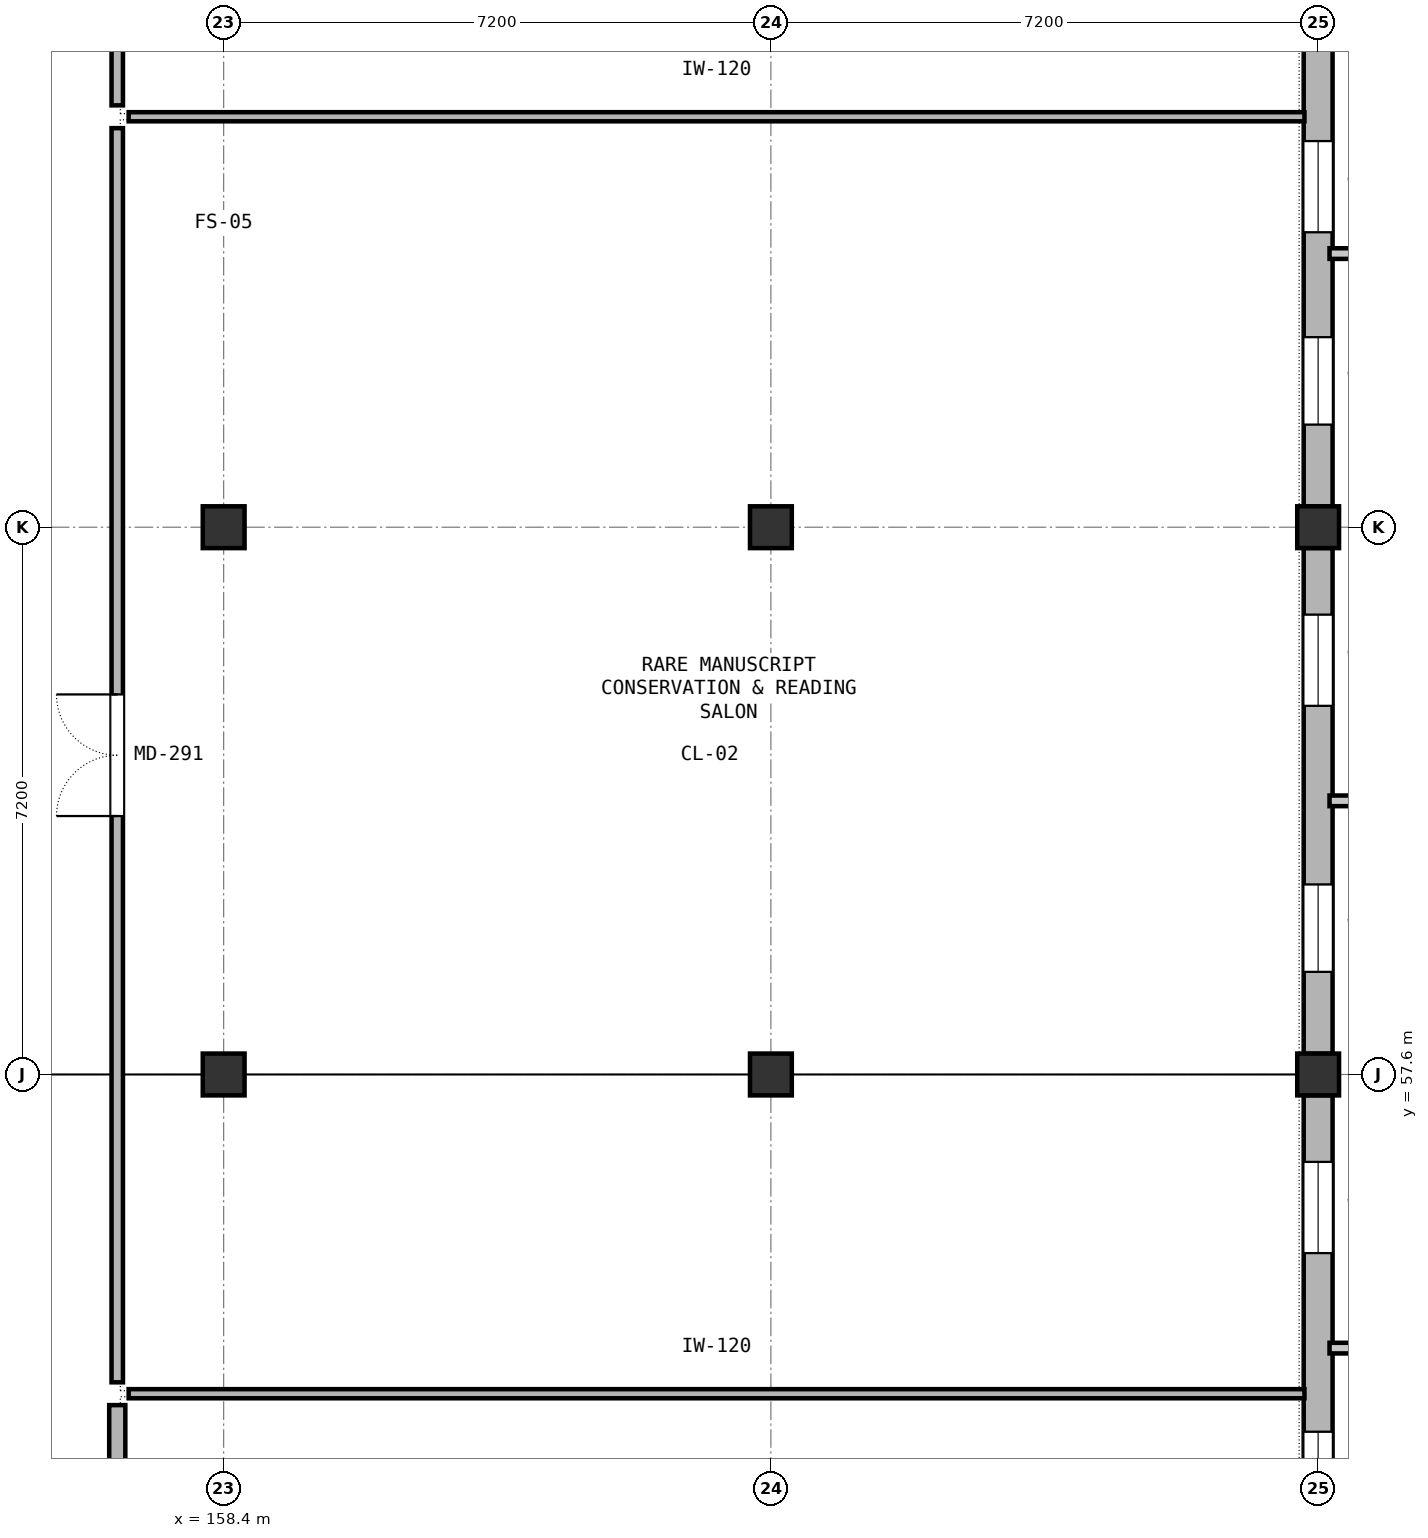
"""IFC4 building model, lengths in metres.
Left out: names, types, materials, properties, quantities, classifications, styles, units other than length and angle.
Written with IfcOpenShell. Run it as: python <this file> out.ifc"""

import sys

from ifc_helpers import new_model, si_unit, direction, frame, frame_2d, origin, origin_2d, place, context, subcontext, project, spatial, rectangle, extrude, element, fill, save


model = new_model("IFC4")
c1 = context("Model", 3, precision=1e-05, world=origin(), true_north=direction((0.0, 1.0)))
c2 = subcontext(c1, "Body", "Model", "MODEL_VIEW")
j1 = project(units=[si_unit("LENGTHUNIT", "METRE"), si_unit("PLANEANGLEUNIT", "RADIAN")], contexts=[c1])
p1 = place(None, origin())
s1 = spatial("IfcSite", under=j1, at=p1, CompositionType="ELEMENT")
p2 = place(p1, origin())
s2 = spatial("IfcBuilding", under=s1, at=p2, CompositionType="ELEMENT")
p3 = place(p2, frame((0.0, 0.0, 14.4)))
s3 = spatial("IfcBuildingStorey", under=s2, at=p3, CompositionType="ELEMENT", Elevation=14.4)
for number, where, z_axis, x_axis in (
    (1, (158.4, 57.6, 0.0), (0.0, 0.0, 1.0), (1.0, 0.0, 0.0)),
    (2, (158.4, 64.8, 0.0), (0.0, 0.0, 1.0), (1.0, 0.0, 0.0)),
    (3, (165.6, 57.6, 0.0), (0.0, 0.0, 1.0), (1.0, 0.0, 0.0)),
    (4, (165.6, 64.8, 0.0), (0.0, 0.0, 1.0), (1.0, 0.0, 0.0)),
    (5, (172.8, 57.6, 0.0), (0.0, 0.0, 1.0), (1.0, 0.0, 0.0)),
    (6, (172.8, 64.8, 0.0), (0.0, 0.0, 1.0), (1.0, 0.0, 0.0)),
):
    element("IfcColumn", number, at=place(p3, frame(where, z_axis=z_axis, x_axis=x_axis)), inside=s3, PredefinedType="COLUMN", context=c2, shape_type="SweptSolid", body=[
        extrude(rectangle(XDim=0.55, YDim=0.55, at=origin_2d()), origin(), (0.0, 0.0, 1.0), 4.2),
    ])
p4 = place(p3, frame((172.8, 57.327, 0.0), z_axis=(0.0, 0.0, 1.0), x_axis=(0.0, -1.0, 0.0)))
e7 = element("IfcWall", 7, at=p4, inside=s3, PredefinedType="SOLIDWALL", context=c2, shape_type="SweptSolid", body=[
    extrude(rectangle(XDim=6.654, YDim=0.38, at=frame_2d((3.327, 0.0))), origin(), (0.0, 0.0, 1.0), 3.04),
])
p5 = place(p4, frame((0.877, 0.0, 0.65)))
e8 = element("IfcOpeningElement", 8, at=p5, cuts=e7, PredefinedType="OPENING", context=c2, shape_type="SweptSolid", body=[
    extrude(rectangle(XDim=1.2, YDim=2.1, at=frame_2d((0.6, 1.05))), frame((0.0, 0.2, 0.0), z_axis=(0.0, -1.0, 0.0), x_axis=(1.0, 0.0, 0.0)), (0.0, 0.0, 1.0), 0.4),
])
p6 = place(p4, frame((4.427, 0.0, 0.65)))
e9 = element("IfcOpeningElement", 9, at=p6, cuts=e7, PredefinedType="OPENING", context=c2, shape_type="SweptSolid", body=[
    extrude(rectangle(XDim=1.15, YDim=2.24, at=frame_2d((0.575, 1.12))), frame((0.0, 0.2, 0.0), z_axis=(0.0, -1.0, 0.0), x_axis=(1.0, 0.0, 0.0)), (0.0, 0.0, 1.0), 0.4),
])
p7 = place(p3, frame((172.8, 64.527, 0.0), z_axis=(0.0, 0.0, 1.0), x_axis=(0.0, -1.0, 0.0)))
e10 = element("IfcWall", 10, at=p7, inside=s3, PredefinedType="SOLIDWALL", context=c2, shape_type="SweptSolid", body=[
    extrude(rectangle(XDim=6.654, YDim=0.38, at=frame_2d((3.327, 0.0))), origin(), (0.0, 0.0, 1.0), 3.04),
])
p8 = place(p7, frame((0.877, 0.0, 0.65)))
e11 = element("IfcOpeningElement", 11, at=p8, cuts=e10, PredefinedType="OPENING", context=c2, shape_type="SweptSolid", body=[
    extrude(rectangle(XDim=1.2, YDim=2.1, at=frame_2d((0.6, 1.05))), frame((0.0, 0.2, 0.0), z_axis=(0.0, -1.0, 0.0), x_axis=(1.0, 0.0, 0.0)), (0.0, 0.0, 1.0), 0.4),
])
p9 = place(p7, frame((4.427, 0.0, 0.65)))
e12 = element("IfcOpeningElement", 12, at=p9, cuts=e10, PredefinedType="OPENING", context=c2, shape_type="SweptSolid", body=[
    extrude(rectangle(XDim=1.15, YDim=2.24, at=frame_2d((0.575, 1.12))), frame((0.0, 0.2, 0.0), z_axis=(0.0, -1.0, 0.0), x_axis=(1.0, 0.0, 0.0)), (0.0, 0.0, 1.0), 0.4),
])
p10 = place(p3, frame((172.8, 71.727, 0.0), z_axis=(0.0, 0.0, 1.0), x_axis=(0.0, -1.0, 0.0)))
e13 = element("IfcWall", 13, at=p10, inside=s3, PredefinedType="SOLIDWALL", context=c2, shape_type="SweptSolid", body=[
    extrude(rectangle(XDim=6.654, YDim=0.38, at=frame_2d((3.327, 0.0))), origin(), (0.0, 0.0, 1.0), 3.04),
])
p11 = place(p10, frame((1.847, 0.0, 0.65)))
e14 = element("IfcOpeningElement", 14, at=p11, cuts=e13, PredefinedType="OPENING", context=c2, shape_type="SweptSolid", body=[
    extrude(rectangle(XDim=1.2, YDim=2.1, at=frame_2d((0.6, 1.05))), frame((0.0, 0.2, 0.0), z_axis=(0.0, -1.0, 0.0), x_axis=(1.0, 0.0, 0.0)), (0.0, 0.0, 1.0), 0.4),
])
p12 = place(p10, frame((4.427, 0.0, 0.65)))
e15 = element("IfcOpeningElement", 15, at=p12, cuts=e13, PredefinedType="OPENING", context=c2, shape_type="SweptSolid", body=[
    extrude(rectangle(XDim=1.15, YDim=2.24, at=frame_2d((0.575, 1.12))), frame((0.0, 0.2, 0.0), z_axis=(0.0, -1.0, 0.0), x_axis=(1.0, 0.0, 0.0)), (0.0, 0.0, 1.0), 0.4),
])
p13 = place(p3, frame((157.0, 36.95, 0.0), z_axis=(0.0, 0.0, 1.0), x_axis=(0.0, 1.0, 0.0)))
e16 = element("IfcWall", 16, at=p13, inside=s3, PredefinedType="PARTITIONING", context=c2, shape_type="SweptSolid", body=[
    extrude(rectangle(XDim=16.3, YDim=0.212, at=frame_2d((8.15, 0.0))), origin(), (0.0, 0.0, 1.0), 3.08),
])
p14 = place(p13, frame((7.65, 0.0, 0.0)))
e17 = element("IfcOpeningElement", 17, at=p14, cuts=e16, PredefinedType="OPENING", context=c2, shape_type="SweptSolid", body=[
    extrude(rectangle(XDim=1.0, YDim=2.2, at=frame_2d((0.5, 1.1))), frame((0.0, 0.116, 0.0), z_axis=(0.0, -1.0, 0.0), x_axis=(1.0, 0.0, 0.0)), (0.0, 0.0, 1.0), 0.232),
])
p15 = place(p3, frame((157.0, 53.55, 0.0), z_axis=(0.0, 0.0, 1.0), x_axis=(0.0, 1.0, 0.0)))
e18 = element("IfcWall", 18, at=p15, inside=s3, PredefinedType="PARTITIONING", context=c2, shape_type="SweptSolid", body=[
    extrude(rectangle(XDim=16.5, YDim=0.15, at=frame_2d((8.25, 0.0))), origin(), (0.0, 0.0, 1.0), 3.08),
])
p16 = place(p15, frame((7.45, 0.0, 0.0)))
e19 = element("IfcOpeningElement", 19, at=p16, cuts=e18, PredefinedType="OPENING", context=c2, shape_type="SweptSolid", body=[
    extrude(rectangle(XDim=1.6, YDim=2.2, at=frame_2d((0.8, 1.1))), frame((0.0, 0.085, 0.0), z_axis=(0.0, -1.0, 0.0), x_axis=(1.0, 0.0, 0.0)), (0.0, 0.0, 1.0), 0.17),
])
p17 = place(p3, frame((157.15, 53.4, 0.0), z_axis=(0.0, 0.0, 1.0), x_axis=(1.0, 0.0, 0.0)))
e20 = element("IfcWall", 20, at=p17, inside=s3, PredefinedType="PARTITIONING", context=c2, shape_type="SweptSolid", body=[
    extrude(rectangle(XDim=15.47, YDim=0.12, at=frame_2d((7.735, 0.0))), origin(), (0.0, 0.0, 1.0), 3.08),
])
p18 = place(p3, frame((157.0, 70.35, 0.0), z_axis=(0.0, 0.0, 1.0), x_axis=(0.0, 1.0, 0.0)))
e21 = element("IfcWall", 21, at=p18, inside=s3, PredefinedType="PARTITIONING", context=c2, shape_type="SweptSolid", body=[
    extrude(rectangle(XDim=8.1, YDim=0.15, at=frame_2d((4.05, 0.0))), origin(), (0.0, 0.0, 1.0), 3.08),
])
p19 = place(p18, frame((3.55, 0.0, 0.0)))
e22 = element("IfcOpeningElement", 22, at=p19, cuts=e21, PredefinedType="OPENING", context=c2, shape_type="SweptSolid", body=[
    extrude(rectangle(XDim=1.0, YDim=2.2, at=frame_2d((0.5, 1.1))), frame((0.0, 0.085, 0.0), z_axis=(0.0, -1.0, 0.0), x_axis=(1.0, 0.0, 0.0)), (0.0, 0.0, 1.0), 0.17),
])
p20 = place(p3, frame((157.15, 70.2, 0.0), z_axis=(0.0, 0.0, 1.0), x_axis=(1.0, 0.0, 0.0)))
e23 = element("IfcWall", 23, at=p20, inside=s3, PredefinedType="PARTITIONING", context=c2, shape_type="SweptSolid", body=[
    extrude(rectangle(XDim=15.47, YDim=0.12, at=frame_2d((7.735, 0.0))), origin(), (0.0, 0.0, 1.0), 3.08),
])
p21 = place(p5, origin())
e24 = element("IfcWindow", 24, at=p21, inside=s3, PartitioningType="DOUBLE_PANEL_VERTICAL", PredefinedType="WINDOW", context=c2, shape_type="SweptSolid", body=[
    extrude(rectangle(XDim=1.2, YDim=2.1, at=frame_2d((0.6, 1.05))), frame((0.0, 0.03, 0.0), z_axis=(0.0, -1.0, 0.0), x_axis=(1.0, 0.0, 0.0)), (0.0, 0.0, 1.0), 0.06),
])
fill(e8, e24)
p22 = place(p6, origin())
e25 = element("IfcWindow", 25, at=p22, inside=s3, PartitioningType="SINGLE_PANEL", PredefinedType="WINDOW", context=c2, shape_type="SweptSolid", body=[
    extrude(rectangle(XDim=1.15, YDim=2.24, at=frame_2d((0.575, 1.12))), frame((0.0, 0.03, 0.0), z_axis=(0.0, -1.0, 0.0), x_axis=(1.0, 0.0, 0.0)), (0.0, 0.0, 1.0), 0.06),
])
fill(e9, e25)
p23 = place(p8, origin())
e26 = element("IfcWindow", 26, at=p23, inside=s3, PartitioningType="DOUBLE_PANEL_VERTICAL", PredefinedType="WINDOW", context=c2, shape_type="SweptSolid", body=[
    extrude(rectangle(XDim=1.2, YDim=2.1, at=frame_2d((0.6, 1.05))), frame((0.0, 0.03, 0.0), z_axis=(0.0, -1.0, 0.0), x_axis=(1.0, 0.0, 0.0)), (0.0, 0.0, 1.0), 0.06),
])
fill(e11, e26)
p24 = place(p9, origin())
e27 = element("IfcWindow", 27, at=p24, inside=s3, PartitioningType="SINGLE_PANEL", PredefinedType="WINDOW", context=c2, shape_type="SweptSolid", body=[
    extrude(rectangle(XDim=1.15, YDim=2.24, at=frame_2d((0.575, 1.12))), frame((0.0, 0.03, 0.0), z_axis=(0.0, -1.0, 0.0), x_axis=(1.0, 0.0, 0.0)), (0.0, 0.0, 1.0), 0.06),
])
fill(e12, e27)
p25 = place(p11, origin())
e28 = element("IfcWindow", 28, at=p25, inside=s3, PartitioningType="DOUBLE_PANEL_VERTICAL", PredefinedType="WINDOW", context=c2, shape_type="SweptSolid", body=[
    extrude(rectangle(XDim=1.2, YDim=2.1, at=frame_2d((0.6, 1.05))), frame((0.0, 0.03, 0.0), z_axis=(0.0, -1.0, 0.0), x_axis=(1.0, 0.0, 0.0)), (0.0, 0.0, 1.0), 0.06),
])
fill(e14, e28)
p26 = place(p12, origin())
e29 = element("IfcWindow", 29, at=p26, inside=s3, PartitioningType="SINGLE_PANEL", PredefinedType="WINDOW", context=c2, shape_type="SweptSolid", body=[
    extrude(rectangle(XDim=1.15, YDim=2.24, at=frame_2d((0.575, 1.12))), frame((0.0, 0.03, 0.0), z_axis=(0.0, -1.0, 0.0), x_axis=(1.0, 0.0, 0.0)), (0.0, 0.0, 1.0), 0.06),
])
fill(e15, e29)
p27 = place(p16, origin())
e30 = element("IfcDoor", 30, at=p27, inside=s3, OperationType="DOUBLE_DOOR_SINGLE_SWING", PredefinedType="DOOR", context=c2, shape_type="SweptSolid", body=[
    extrude(rectangle(XDim=1.6, YDim=2.2, at=frame_2d((0.8, 1.1))), frame((0.0, 0.025, 0.0), z_axis=(0.0, -1.0, 0.0), x_axis=(1.0, 0.0, 0.0)), (0.0, 0.0, 1.0), 0.05),
])
fill(e19, e30)
save(model, sys.argv[1])
